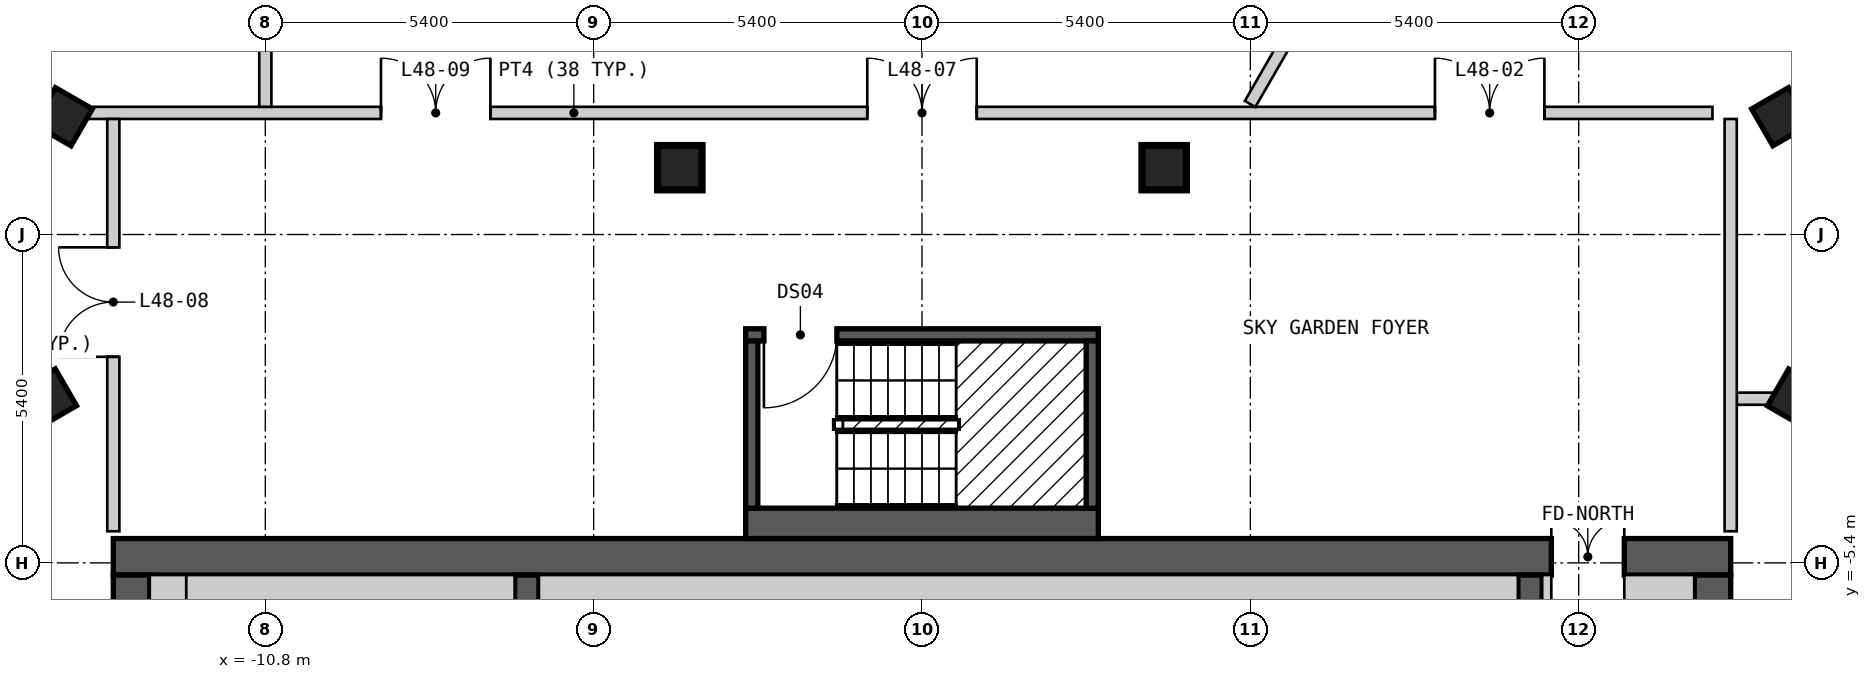
"""IFC4 building model, lengths in metres.
Left out: names, types, materials, properties, quantities, classifications, styles, units other than length and angle.
Written with IfcOpenShell. Run it as: python <this file> out.ifc"""

import sys

from ifc_helpers import new_model, si_unit, direction, frame, frame_2d, origin, origin_2d, place, context, subcontext, project, spatial, rectangle, extrude, element, fill, save


model = new_model("IFC4")
c1 = context("Model", 3, precision=1e-05, world=origin(), true_north=direction((0.0, 1.0)))
c2 = subcontext(c1, "Body", "Model", "MODEL_VIEW")
j1 = project(units=[si_unit("LENGTHUNIT", "METRE"), si_unit("PLANEANGLEUNIT", "RADIAN")], contexts=[c1])
p1 = place(None, origin())
s1 = spatial("IfcSite", under=j1, at=p1, CompositionType="ELEMENT")
p2 = place(p1, origin())
s2 = spatial("IfcBuilding", under=s1, at=p2, CompositionType="ELEMENT")
p3 = place(p2, frame((0.0, 0.0, 157.2)))
s3 = spatial("IfcBuildingStorey", under=s2, at=p3, CompositionType="ELEMENT", Elevation=157.2)
for number, where, z_axis, x_axis in (
    (1, (-14.383, -2.687, 0.0), (0.0, 0.0, 1.0), (0.5, -0.866, 0.0)),
    (2, (14.382, -2.689, 0.0), (0.0, 0.0, 1.0), (0.5, 0.866, 0.0)),
    (3, (14.123, 1.937, 0.0), (0.0, 0.0, 1.0), (-0.5, 0.866, 0.0)),
    (4, (3.984, 1.1, 0.0), (0.0, 0.0, 1.0), (1.0, 0.0, 0.0)),
    (5, (-3.984, 1.1, 0.0), (0.0, 0.0, 1.0), (1.0, 0.0, 0.0)),
    (6, (-14.123, 1.937, 0.0), (0.0, 0.0, 1.0), (-0.5, -0.866, 0.0)),
):
    element("IfcColumn", number, at=place(p3, frame(where, z_axis=z_axis, x_axis=x_axis)), inside=s3, PredefinedType="COLUMN", context=c2, shape_type="SweptSolid", body=[
        extrude(rectangle(XDim=0.7, YDim=0.7, at=origin_2d()), origin(), (0.0, 0.0, 1.0), 6.0),
    ])
p4 = place(p3, frame((-13.3, -5.3, 0.0), z_axis=(0.0, 0.0, 1.0), x_axis=(1.0, 0.0, 0.0)))
e7 = element("IfcWall", 7, at=p4, inside=s3, PredefinedType="SHEAR", context=c2, shape_type="SweptSolid", body=[
    extrude(rectangle(XDim=26.6, YDim=0.6, at=frame_2d((13.3, 0.0))), origin(), (0.0, 0.0, 1.0), 5.7),
])
p5 = place(p4, frame((23.65, 0.0, 0.0)))
e8 = element("IfcOpeningElement", 8, at=p5, cuts=e7, PredefinedType="OPENING", context=c2, shape_type="SweptSolid", body=[
    extrude(rectangle(XDim=1.2, YDim=2.1, at=frame_2d((0.6, 1.05))), frame((0.0, 0.31, 0.0), z_axis=(0.0, -1.0, 0.0), x_axis=(1.0, 0.0, 0.0)), (0.0, 0.0, 1.0), 0.62),
])
p6 = place(p3, frame((-13.0, -18.4, 0.0), z_axis=(0.0, 0.0, 1.0), x_axis=(0.0, 1.0, 0.0)))
e9 = element("IfcWall", 9, at=p6, inside=s3, PredefinedType="SHEAR", context=c2, shape_type="SweptSolid", body=[
    extrude(rectangle(XDim=12.8, YDim=0.6, at=frame_2d((6.4, 0.0))), origin(), (0.0, 0.0, 1.0), 5.7),
])
p7 = place(p6, frame((4.2, 0.0, 0.0)))
e10 = element("IfcOpeningElement", 10, at=p7, cuts=e9, PredefinedType="OPENING", context=c2, shape_type="SweptSolid", body=[
    extrude(rectangle(XDim=1.2, YDim=2.1, at=frame_2d((0.6, 1.05))), frame((0.0, 0.31, 0.0), z_axis=(0.0, -1.0, 0.0), x_axis=(1.0, 0.0, 0.0)), (0.0, 0.0, 1.0), 0.62),
])
p8 = place(p3, frame((13.0, -18.4, 0.0), z_axis=(0.0, 0.0, 1.0), x_axis=(0.0, 1.0, 0.0)))
e11 = element("IfcWall", 11, at=p8, inside=s3, PredefinedType="SHEAR", context=c2, shape_type="SweptSolid", body=[
    extrude(rectangle(XDim=12.8, YDim=0.6, at=frame_2d((6.4, 0.0))), origin(), (0.0, 0.0, 1.0), 5.7),
])
for number, where, z_axis, x_axis in (
    (12, (-6.5, -9.15, 0.0), (0.0, 0.0, 1.0), (0.0, 1.0, 0.0)),
    (13, (10.0, -9.15, 0.0), (0.0, 0.0, 1.0), (0.0, 1.0, 0.0)),
):
    element("IfcWall", number, at=place(p3, frame(where, z_axis=z_axis, x_axis=x_axis)), inside=s3, PredefinedType="SHEAR", context=c2, shape_type="SweptSolid", body=[
        extrude(rectangle(XDim=3.55, YDim=0.4, at=frame_2d((1.775, 0.0))), origin(), (0.0, 0.0, 1.0), 5.7),
    ])
p9 = place(p3, frame((-2.9, -4.75, 0.0), z_axis=(0.0, 0.0, 1.0), x_axis=(1.0, 0.0, 0.0)))
e14 = element("IfcWall", 14, at=p9, inside=s3, PredefinedType="SOLIDWALL", context=c2, shape_type="SweptSolid", body=[
    extrude(rectangle(XDim=5.8, YDim=0.5, at=frame_2d((2.9, 0.0))), origin(), (0.0, 0.0, 1.0), 5.7),
])
p10 = place(p3, frame((-2.9, -1.65, 0.0), z_axis=(0.0, 0.0, 1.0), x_axis=(1.0, 0.0, 0.0)))
e15 = element("IfcWall", 15, at=p10, inside=s3, PredefinedType="SOLIDWALL", context=c2, shape_type="SweptSolid", body=[
    extrude(rectangle(XDim=5.8, YDim=0.2, at=frame_2d((2.9, 0.0))), origin(), (0.0, 0.0, 1.0), 5.7),
])
p11 = place(p10, frame((0.3, 0.0, 0.0)))
e16 = element("IfcOpeningElement", 16, at=p11, cuts=e15, PredefinedType="OPENING", context=c2, shape_type="SweptSolid", body=[
    extrude(rectangle(XDim=1.2, YDim=2.1, at=frame_2d((0.6, 1.05))), frame((0.0, 0.11, 0.0), z_axis=(0.0, -1.0, 0.0), x_axis=(1.0, 0.0, 0.0)), (0.0, 0.0, 1.0), 0.22),
])
for number, where, z_axis, x_axis in (
    (17, (-2.8, -4.5, 0.0), (0.0, 0.0, 1.0), (0.0, 1.0, 0.0)),
    (18, (2.8, -4.5, 0.0), (0.0, 0.0, 1.0), (0.0, 1.0, 0.0)),
):
    element("IfcWall", number, at=place(p3, frame(where, z_axis=z_axis, x_axis=x_axis)), inside=s3, PredefinedType="SOLIDWALL", context=c2, shape_type="SweptSolid", body=[
        extrude(rectangle(XDim=2.75, YDim=0.2, at=frame_2d((1.375, 0.0))), origin(), (0.0, 0.0, 1.0), 5.7),
    ])
p12 = place(p3, frame((13.4, -2.7, 0.0), z_axis=(0.0, 0.0, 1.0), x_axis=(1.0, 0.0, 0.0)))
e19 = element("IfcWall", 19, at=p12, inside=s3, PredefinedType="PARTITIONING", context=c2, shape_type="SweptSolid", body=[
    extrude(rectangle(XDim=2.2, YDim=0.2, at=frame_2d((1.1, 0.0))), origin(), (0.0, 0.0, 1.0), 5.7),
])
p13 = place(p3, frame((-24.451, 2.0, 0.0), z_axis=(0.0, 0.0, 1.0), x_axis=(1.0, 0.0, 0.0)))
e20 = element("IfcWall", 20, at=p13, inside=s3, PredefinedType="PARTITIONING", context=c2, shape_type="SweptSolid", body=[
    extrude(rectangle(XDim=37.451, YDim=0.2, at=frame_2d((18.726, 0.0))), origin(), (0.0, 0.0, 1.0), 5.7),
])
p14 = place(p13, frame((32.887, 0.0, 0.0)))
e21 = element("IfcOpeningElement", 21, at=p14, cuts=e20, PredefinedType="OPENING", context=c2, shape_type="SweptSolid", body=[
    extrude(rectangle(XDim=1.8, YDim=2.1, at=frame_2d((0.9, 1.05))), frame((0.0, 0.11, 0.0), z_axis=(0.0, -1.0, 0.0), x_axis=(1.0, 0.0, 0.0)), (0.0, 0.0, 1.0), 0.22),
])
p15 = place(p13, frame((23.551, 0.0, 0.0)))
e22 = element("IfcOpeningElement", 22, at=p15, cuts=e20, PredefinedType="OPENING", context=c2, shape_type="SweptSolid", body=[
    extrude(rectangle(XDim=1.8, YDim=2.1, at=frame_2d((0.9, 1.05))), frame((0.0, 0.11, 0.0), z_axis=(0.0, -1.0, 0.0), x_axis=(1.0, 0.0, 0.0)), (0.0, 0.0, 1.0), 0.22),
])
p16 = place(p13, frame((15.553, 0.0, 0.0)))
e23 = element("IfcOpeningElement", 23, at=p16, cuts=e20, PredefinedType="OPENING", context=c2, shape_type="SweptSolid", body=[
    extrude(rectangle(XDim=1.8, YDim=2.1, at=frame_2d((0.9, 1.05))), frame((0.0, 0.11, 0.0), z_axis=(0.0, -1.0, 0.0), x_axis=(1.0, 0.0, 0.0)), (0.0, 0.0, 1.0), 0.22),
])
p17 = place(p3, frame((-13.3, -4.88, 0.0), z_axis=(0.0, 0.0, 1.0), x_axis=(0.0, 1.0, 0.0)))
e24 = element("IfcWall", 24, at=p17, inside=s3, PredefinedType="PARTITIONING", context=c2, shape_type="SweptSolid", body=[
    extrude(rectangle(XDim=6.78, YDim=0.2, at=frame_2d((3.39, 0.0))), origin(), (0.0, 0.0, 1.0), 5.7),
])
p18 = place(p17, frame((2.869, 0.0, 0.0)))
e25 = element("IfcOpeningElement", 25, at=p18, cuts=e24, PredefinedType="OPENING", context=c2, shape_type="SweptSolid", body=[
    extrude(rectangle(XDim=1.8, YDim=2.1, at=frame_2d((0.9, 1.05))), frame((0.0, 0.11, 0.0), z_axis=(0.0, -1.0, 0.0), x_axis=(1.0, 0.0, 0.0)), (0.0, 0.0, 1.0), 0.22),
])
p19 = place(p3, frame((-10.8, 2.1, 0.0), z_axis=(0.0, 0.0, 1.0), x_axis=(0.0, 1.0, 0.0)))
e26 = element("IfcWall", 26, at=p19, inside=s3, PredefinedType="PARTITIONING", context=c2, shape_type="SweptSolid", body=[
    extrude(rectangle(XDim=7.0, YDim=0.2, at=frame_2d((3.5, 0.0))), origin(), (0.0, 0.0, 1.0), 5.7),
])
p20 = place(p19, frame((2.029, 0.0, 0.0)))
e27 = element("IfcOpeningElement", 27, at=p20, cuts=e26, PredefinedType="OPENING", context=c2, shape_type="SweptSolid", body=[
    extrude(rectangle(XDim=1.8, YDim=2.1, at=frame_2d((0.9, 1.05))), frame((0.0, 0.11, 0.0), z_axis=(0.0, -1.0, 0.0), x_axis=(1.0, 0.0, 0.0)), (0.0, 0.0, 1.0), 0.22),
])
p21 = place(p3, frame((13.3, -4.88, 0.0), z_axis=(0.0, 0.0, 1.0), x_axis=(0.0, 1.0, 0.0)))
e28 = element("IfcWall", 28, at=p21, inside=s3, PredefinedType="PARTITIONING", context=c2, shape_type="SweptSolid", body=[
    extrude(rectangle(XDim=6.78, YDim=0.2, at=frame_2d((3.39, 0.0))), origin(), (0.0, 0.0, 1.0), 5.7),
])
p22 = place(p3, frame((5.396, 2.147, 0.0), z_axis=(0.0, 0.0, 1.0), x_axis=(0.500030520673, 0.866007781949, 0.0)))
e29 = element("IfcWall", 29, at=p22, inside=s3, PredefinedType="PARTITIONING", context=c2, shape_type="SweptSolid", body=[
    extrude(rectangle(XDim=6.585, YDim=0.2, at=frame_2d((3.293, 0.0))), origin(), (0.0, 0.0, 1.0), 5.7),
])
p23 = place(p3, frame((-12.4, -9.15, 0.0), z_axis=(0.0, 0.0, 1.0), x_axis=(0.0, 1.0, 0.0)))
e30 = element("IfcWall", 30, at=p23, inside=s3, PredefinedType="SOLIDWALL", context=c2, shape_type="SweptSolid", body=[
    extrude(rectangle(XDim=3.55, YDim=0.6, at=frame_2d((1.775, 0.0))), origin(), (0.0, 0.0, 1.0), 5.7),
])
p24 = place(p3, frame((-12.1, -5.9, 0.0), z_axis=(0.0, 0.0, 1.0), x_axis=(1.0, 0.0, 0.0)))
e31 = element("IfcWall", 31, at=p24, inside=s3, PredefinedType="SOLIDWALL", context=c2, shape_type="SweptSolid", body=[
    extrude(rectangle(XDim=5.4, YDim=0.6, at=frame_2d((2.7, 0.0))), origin(), (0.0, 0.0, 1.0), 5.7),
])
p25 = place(p3, frame((-6.3, -5.9, 0.0), z_axis=(0.0, 0.0, 1.0), x_axis=(1.0, 0.0, 0.0)))
e32 = element("IfcWall", 32, at=p25, inside=s3, PredefinedType="SOLIDWALL", context=c2, shape_type="SweptSolid", body=[
    extrude(rectangle(XDim=16.1, YDim=0.6, at=frame_2d((8.05, 0.0))), origin(), (0.0, 0.0, 1.0), 5.7),
])
p26 = place(p3, frame((10.275, -6.2, 0.0), z_axis=(0.0, 0.0, 1.0), x_axis=(0.0, 1.0, 0.0)))
e33 = element("IfcWall", 33, at=p26, inside=s3, PredefinedType="PARTITIONING", context=c2, shape_type="SweptSolid", body=[
    extrude(rectangle(XDim=0.6, YDim=0.15, at=frame_2d((0.3, 0.0))), origin(), (0.0, 0.0, 1.0), 5.7),
])
p27 = place(p3, frame((11.55, -5.9, 0.0), z_axis=(0.0, 0.0, 1.0), x_axis=(1.0, 0.0, 0.0)))
e34 = element("IfcWall", 34, at=p27, inside=s3, PredefinedType="PARTITIONING", context=c2, shape_type="SweptSolid", body=[
    extrude(rectangle(XDim=1.15, YDim=0.6, at=frame_2d((0.575, 0.0))), origin(), (0.0, 0.0, 1.0), 5.7),
])
p28 = place(p11, origin())
e35 = element("IfcDoor", 35, at=p28, inside=s3, OperationType="SINGLE_SWING_LEFT", PredefinedType="DOOR", context=c2, shape_type="SweptSolid", body=[
    extrude(rectangle(XDim=1.2, YDim=2.1, at=frame_2d((0.6, 1.05))), frame((0.0, 0.025, 0.0), z_axis=(0.0, -1.0, 0.0), x_axis=(1.0, 0.0, 0.0)), (0.0, 0.0, 1.0), 0.05),
])
fill(e16, e35)
p29 = place(p14, origin())
e36 = element("IfcDoor", 36, at=p29, inside=s3, OperationType="DOUBLE_DOOR_SINGLE_SWING", PredefinedType="DOOR", context=c2, shape_type="SweptSolid", body=[
    extrude(rectangle(XDim=1.8, YDim=2.1, at=frame_2d((0.9, 1.05))), frame((0.0, 0.025, 0.0), z_axis=(0.0, -1.0, 0.0), x_axis=(1.0, 0.0, 0.0)), (0.0, 0.0, 1.0), 0.05),
])
fill(e21, e36)
p30 = place(p15, origin())
e37 = element("IfcDoor", 37, at=p30, inside=s3, OperationType="DOUBLE_DOOR_SINGLE_SWING", PredefinedType="DOOR", context=c2, shape_type="SweptSolid", body=[
    extrude(rectangle(XDim=1.8, YDim=2.1, at=frame_2d((0.9, 1.05))), frame((0.0, 0.025, 0.0), z_axis=(0.0, -1.0, 0.0), x_axis=(1.0, 0.0, 0.0)), (0.0, 0.0, 1.0), 0.05),
])
fill(e22, e37)
p31 = place(p18, origin())
e38 = element("IfcDoor", 38, at=p31, inside=s3, OperationType="DOUBLE_DOOR_SINGLE_SWING", PredefinedType="DOOR", context=c2, shape_type="SweptSolid", body=[
    extrude(rectangle(XDim=1.8, YDim=2.1, at=frame_2d((0.9, 1.05))), frame((0.0, 0.025, 0.0), z_axis=(0.0, -1.0, 0.0), x_axis=(1.0, 0.0, 0.0)), (0.0, 0.0, 1.0), 0.05),
])
fill(e25, e38)
p32 = place(p16, origin())
e39 = element("IfcDoor", 39, at=p32, inside=s3, OperationType="DOUBLE_DOOR_SINGLE_SWING", PredefinedType="DOOR", context=c2, shape_type="SweptSolid", body=[
    extrude(rectangle(XDim=1.8, YDim=2.1, at=frame_2d((0.9, 1.05))), frame((0.0, 0.025, 0.0), z_axis=(0.0, -1.0, 0.0), x_axis=(1.0, 0.0, 0.0)), (0.0, 0.0, 1.0), 0.05),
])
fill(e23, e39)
p33 = place(p5, origin())
e40 = element("IfcDoor", 40, at=p33, inside=s3, OperationType="DOUBLE_DOOR_SINGLE_SWING", PredefinedType="DOOR", context=c2, shape_type="SweptSolid", body=[
    extrude(rectangle(XDim=1.2, YDim=2.1, at=frame_2d((0.6, 1.05))), frame((0.0, 0.025, 0.0), z_axis=(0.0, -1.0, 0.0), x_axis=(1.0, 0.0, 0.0)), (0.0, 0.0, 1.0), 0.05),
])
fill(e8, e40)
save(model, sys.argv[1])
